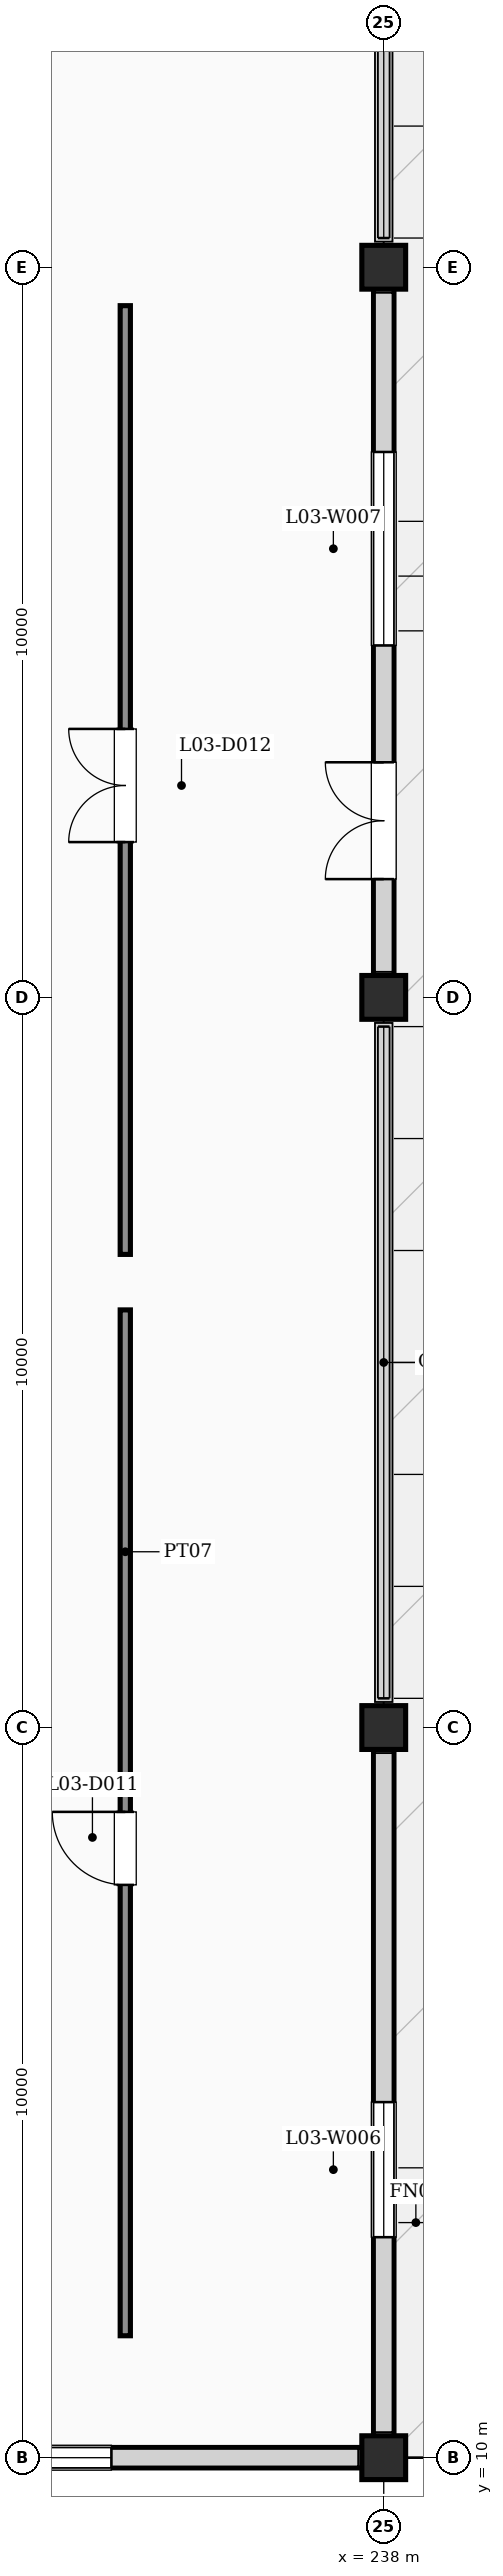
"""IFC4 building model, lengths in metres.
Left out: names, types, materials, properties, quantities, classifications, styles, units other than length and angle.
Written with IfcOpenShell. Run it as: python <this file> out.ifc"""

import sys

from ifc_helpers import new_model, si_unit, direction, frame, frame_2d, origin, origin_2d, place, context, subcontext, project, spatial, rectangle, extrude, element, fill, save


model = new_model("IFC4")
c1 = context("Model", 3, precision=1e-05, world=origin(), true_north=direction((0.0, 1.0)))
c2 = subcontext(c1, "Body", "Model", "MODEL_VIEW")
j1 = project(units=[si_unit("LENGTHUNIT", "METRE"), si_unit("PLANEANGLEUNIT", "RADIAN")], contexts=[c1])
p1 = place(None, origin())
s1 = spatial("IfcSite", under=j1, at=p1, CompositionType="ELEMENT")
p2 = place(p1, origin())
s2 = spatial("IfcBuilding", under=s1, at=p2, CompositionType="ELEMENT")
p3 = place(p2, frame((0.0, 0.0, 15.0)))
s3 = spatial("IfcBuildingStorey", under=s2, at=p3, CompositionType="ELEMENT", Elevation=15.0)
for number, where, z_axis, x_axis in (
    (1, (238.0, 10.0, 0.0), (0.0, 0.0, 1.0), (1.0, 0.0, 0.0)),
    (2, (238.0, 20.0, 0.0), (0.0, 0.0, 1.0), (1.0, 0.0, 0.0)),
    (3, (238.0, 30.0, 0.0), (0.0, 0.0, 1.0), (1.0, 0.0, 0.0)),
    (4, (238.0, 40.0, 0.0), (0.0, 0.0, 1.0), (1.0, 0.0, 0.0)),
):
    element("IfcColumn", number, at=place(p3, frame(where, z_axis=z_axis, x_axis=x_axis)), inside=s3, PredefinedType="COLUMN", context=c2, shape_type="SweptSolid", body=[
        extrude(rectangle(XDim=0.6, YDim=0.6, at=origin_2d()), origin(), (0.0, 0.0, 1.0), 4.2),
    ])
p4 = place(p3, frame((238.0, 10.22, 0.0), z_axis=(0.0, 0.0, 1.0), x_axis=(0.0, 1.0, 0.0)))
e5 = element("IfcWall", 5, at=p4, inside=s3, PredefinedType="SOLIDWALL", context=c2, shape_type="SweptSolid", body=[
    extrude(rectangle(XDim=9.56, YDim=0.28, at=frame_2d((4.78, 0.0))), origin(), (0.0, 0.0, 1.0), 3.28),
])
p5 = place(p4, frame((2.8, 0.0, 0.9)))
e6 = element("IfcOpeningElement", 6, at=p5, cuts=e5, PredefinedType="OPENING", context=c2, shape_type="SweptSolid", body=[
    extrude(rectangle(XDim=1.85, YDim=1.7, at=frame_2d((0.925, 0.85))), frame((0.0, 0.15, 0.0), z_axis=(0.0, -1.0, 0.0), x_axis=(1.0, 0.0, 0.0)), (0.0, 0.0, 1.0), 0.3),
])
p6 = place(p3, frame((238.0, 30.22, 0.0), z_axis=(0.0, 0.0, 1.0), x_axis=(0.0, 1.0, 0.0)))
e7 = element("IfcWall", 7, at=p6, inside=s3, PredefinedType="SOLIDWALL", context=c2, shape_type="SweptSolid", body=[
    extrude(rectangle(XDim=9.56, YDim=0.28, at=frame_2d((4.78, 0.0))), origin(), (0.0, 0.0, 1.0), 3.28),
])
p7 = place(p6, frame((1.4, 0.0, 0.0)))
e8 = element("IfcOpeningElement", 8, at=p7, cuts=e7, PredefinedType="OPENING", context=c2, shape_type="SweptSolid", body=[
    extrude(rectangle(XDim=1.6, YDim=2.3, at=frame_2d((0.8, 1.15))), frame((0.0, 0.15, 0.0), z_axis=(0.0, -1.0, 0.0), x_axis=(1.0, 0.0, 0.0)), (0.0, 0.0, 1.0), 0.3),
])
p8 = place(p6, frame((4.6, 0.0, 0.9)))
e9 = element("IfcOpeningElement", 9, at=p8, cuts=e7, PredefinedType="OPENING", context=c2, shape_type="SweptSolid", body=[
    extrude(rectangle(XDim=2.65, YDim=1.85, at=frame_2d((1.325, 0.925))), frame((0.0, 0.15, 0.0), z_axis=(0.0, -1.0, 0.0), x_axis=(1.0, 0.0, 0.0)), (0.0, 0.0, 1.0), 0.3),
])
p9 = place(p3, frame((230.22, 10.0, 0.0), z_axis=(0.0, 0.0, 1.0), x_axis=(1.0, 0.0, 0.0)))
e10 = element("IfcWall", 10, at=p9, inside=s3, PredefinedType="SOLIDWALL", context=c2, shape_type="SweptSolid", body=[
    extrude(rectangle(XDim=7.56, YDim=0.28, at=frame_2d((3.78, 0.0))), origin(), (0.0, 0.0, 1.0), 3.28),
])
p10 = place(p9, frame((2.2, 0.0, 0.95)))
e11 = element("IfcOpeningElement", 11, at=p10, cuts=e10, PredefinedType="OPENING", context=c2, shape_type="SweptSolid", body=[
    extrude(rectangle(XDim=1.85, YDim=1.7, at=frame_2d((0.925, 0.85))), frame((0.0, 0.15, 0.0), z_axis=(0.0, -1.0, 0.0), x_axis=(1.0, 0.0, 0.0)), (0.0, 0.0, 1.0), 0.3),
])
p11 = place(p3, frame((230.35, 10.0, 4.2), z_axis=(0.0, 0.0, 1.0), x_axis=(1.0, 0.0, 0.0)))
e12 = element("IfcWall", 12, at=p11, inside=s3, PredefinedType="PARAPET", context=c2, shape_type="SweptSolid", body=[
    extrude(rectangle(XDim=7.3, YDim=0.24, at=frame_2d((3.65, 0.0))), origin(), (0.0, 0.0, 1.0), 1.15),
])
for number, where, z_axis, x_axis in (
    (13, (238.0, 10.35, 4.2), (0.0, 0.0, 1.0), (0.0, 1.0, 0.0)),
    (14, (238.0, 20.35, 4.2), (0.0, 0.0, 1.0), (0.0, 1.0, 0.0)),
    (15, (238.0, 30.35, 4.2), (0.0, 0.0, 1.0), (0.0, 1.0, 0.0)),
    (16, (238.0, 40.35, 4.2), (0.0, 0.0, 1.0), (0.0, 1.0, 0.0)),
):
    element("IfcWall", number, at=place(p3, frame(where, z_axis=z_axis, x_axis=x_axis)), inside=s3, PredefinedType="PARAPET", context=c2, shape_type="SweptSolid", body=[
        extrude(rectangle(XDim=9.3, YDim=0.24, at=frame_2d((4.65, 0.0))), origin(), (0.0, 0.0, 1.0), 1.15),
    ])
p12 = place(p3, frame((234.46, 11.67, 0.0), z_axis=(0.0, 0.0, 1.0), x_axis=(0.0, 1.0, 0.0)))
e17 = element("IfcWall", 17, at=p12, inside=s3, PredefinedType="PARTITIONING", context=c2, shape_type="SweptSolid", body=[
    extrude(rectangle(XDim=14.05, YDim=0.14, at=frame_2d((7.025, 0.0))), origin(), (0.0, 0.0, 1.0), 3.96),
])
p13 = place(p12, frame((6.175, 0.0, 0.0)))
e18 = element("IfcOpeningElement", 18, at=p13, cuts=e17, PredefinedType="OPENING", context=c2, shape_type="SweptSolid", body=[
    extrude(rectangle(XDim=1.0, YDim=2.2, at=frame_2d((0.5, 1.1))), frame((0.0, 0.08, 0.0), z_axis=(0.0, -1.0, 0.0), x_axis=(1.0, 0.0, 0.0)), (0.0, 0.0, 1.0), 0.16),
])
p14 = place(p3, frame((234.46, 26.48, 0.0), z_axis=(0.0, 0.0, 1.0), x_axis=(0.0, 1.0, 0.0)))
e19 = element("IfcWall", 19, at=p14, inside=s3, PredefinedType="PARTITIONING", context=c2, shape_type="SweptSolid", body=[
    extrude(rectangle(XDim=12.994, YDim=0.14, at=frame_2d((6.497, 0.0))), origin(), (0.0, 0.0, 1.0), 3.96),
])
p15 = place(p14, frame((5.647, 0.0, 0.0)))
e20 = element("IfcOpeningElement", 20, at=p15, cuts=e19, PredefinedType="OPENING", context=c2, shape_type="SweptSolid", body=[
    extrude(rectangle(XDim=1.55, YDim=2.25, at=frame_2d((0.775, 1.125))), frame((0.0, 0.08, 0.0), z_axis=(0.0, -1.0, 0.0), x_axis=(1.0, 0.0, 0.0)), (0.0, 0.0, 1.0), 0.16),
])
p16 = place(p5, origin())
e21 = element("IfcWindow", 21, at=p16, inside=s3, PartitioningType="SINGLE_PANEL", PredefinedType="WINDOW", context=c2, shape_type="SweptSolid", body=[
    extrude(rectangle(XDim=1.85, YDim=1.7, at=frame_2d((0.925, 0.85))), frame((0.0, 0.03, 0.0), z_axis=(0.0, -1.0, 0.0), x_axis=(1.0, 0.0, 0.0)), (0.0, 0.0, 1.0), 0.06),
])
fill(e6, e21)
p17 = place(p7, origin())
e22 = element("IfcDoor", 22, at=p17, inside=s3, OperationType="DOUBLE_DOOR_SINGLE_SWING", PredefinedType="DOOR", context=c2, shape_type="SweptSolid", body=[
    extrude(rectangle(XDim=1.6, YDim=2.3, at=frame_2d((0.8, 1.15))), frame((0.0, 0.025, 0.0), z_axis=(0.0, -1.0, 0.0), x_axis=(1.0, 0.0, 0.0)), (0.0, 0.0, 1.0), 0.05),
])
fill(e8, e22)
p18 = place(p8, origin())
e23 = element("IfcWindow", 23, at=p18, inside=s3, PartitioningType="SINGLE_PANEL", PredefinedType="WINDOW", context=c2, shape_type="SweptSolid", body=[
    extrude(rectangle(XDim=2.65, YDim=1.85, at=frame_2d((1.325, 0.925))), frame((0.0, 0.03, 0.0), z_axis=(0.0, -1.0, 0.0), x_axis=(1.0, 0.0, 0.0)), (0.0, 0.0, 1.0), 0.06),
])
fill(e9, e23)
p19 = place(p10, origin())
e24 = element("IfcWindow", 24, at=p19, inside=s3, PartitioningType="SINGLE_PANEL", PredefinedType="WINDOW", context=c2, shape_type="SweptSolid", body=[
    extrude(rectangle(XDim=1.85, YDim=1.7, at=frame_2d((0.925, 0.85))), frame((0.0, 0.03, 0.0), z_axis=(0.0, -1.0, 0.0), x_axis=(1.0, 0.0, 0.0)), (0.0, 0.0, 1.0), 0.06),
])
fill(e11, e24)
p20 = place(p13, origin())
e25 = element("IfcDoor", 25, at=p20, inside=s3, OperationType="SINGLE_SWING_RIGHT", PredefinedType="DOOR", context=c2, shape_type="SweptSolid", body=[
    extrude(rectangle(XDim=1.0, YDim=2.2, at=frame_2d((0.5, 1.1))), frame((0.0, 0.025, 0.0), z_axis=(0.0, -1.0, 0.0), x_axis=(1.0, 0.0, 0.0)), (0.0, 0.0, 1.0), 0.05),
])
fill(e18, e25)
p21 = place(p15, origin())
e26 = element("IfcDoor", 26, at=p21, inside=s3, OperationType="DOUBLE_DOOR_SINGLE_SWING", PredefinedType="DOOR", context=c2, shape_type="SweptSolid", body=[
    extrude(rectangle(XDim=1.55, YDim=2.25, at=frame_2d((0.775, 1.125))), frame((0.0, 0.025, 0.0), z_axis=(0.0, -1.0, 0.0), x_axis=(1.0, 0.0, 0.0)), (0.0, 0.0, 1.0), 0.05),
])
fill(e20, e26)
save(model, sys.argv[1])
